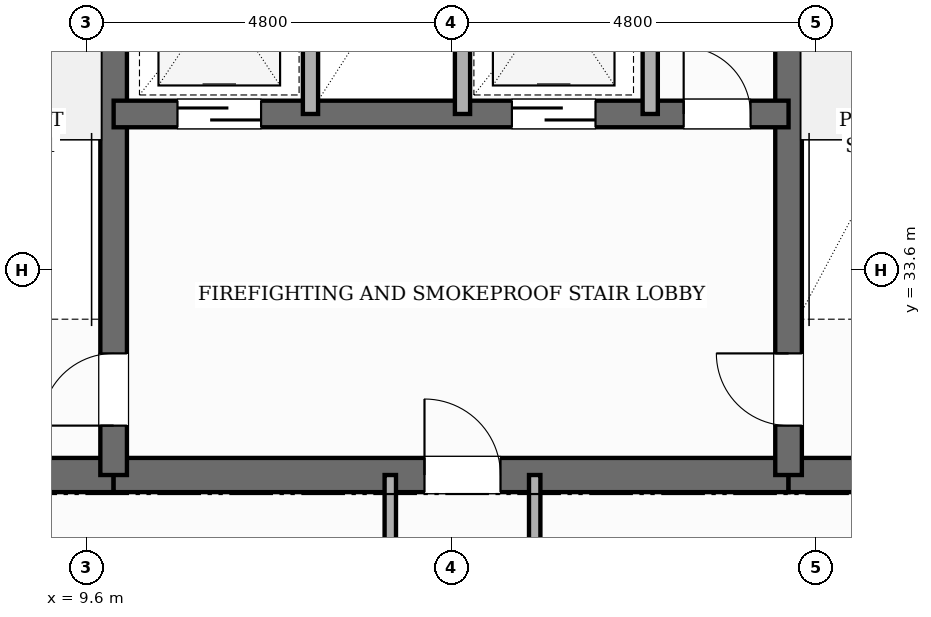
"""IFC4 building model, lengths in metres.
Left out: names, types, materials, properties, quantities, classifications, styles, units other than length and angle.
Written with IfcOpenShell. Run it as: python <this file> out.ifc"""

import sys

from ifc_helpers import new_model, si_unit, direction, frame, frame_2d, origin, place, context, subcontext, project, spatial, rectangle, extrude, element, fill, save


model = new_model("IFC4")
c1 = context("Model", 3, precision=1e-05, world=origin(), true_north=direction((0.0, 1.0)))
c2 = subcontext(c1, "Body", "Model", "MODEL_VIEW")
j1 = project(units=[si_unit("LENGTHUNIT", "METRE"), si_unit("PLANEANGLEUNIT", "RADIAN")], contexts=[c1])
p1 = place(None, origin())
s1 = spatial("IfcSite", under=j1, at=p1, CompositionType="ELEMENT")
p2 = place(p1, origin())
s2 = spatial("IfcBuilding", under=s1, at=p2, CompositionType="ELEMENT")
p3 = place(p2, frame((0.0, 0.0, 236.2)))
s3 = spatial("IfcBuildingStorey", under=s2, at=p3, CompositionType="ELEMENT", Elevation=236.2)
p4 = place(p3, frame((6.05, 30.9, 0.0), z_axis=(0.0, 0.0, 1.0), x_axis=(1.0, 0.0, 0.0)))
e1 = element("IfcWall", 1, at=p4, inside=s3, PredefinedType="SHEAR", context=c2, shape_type="SweptSolid", body=[
    extrude(rectangle(XDim=3.91, YDim=0.45, at=frame_2d((1.955, 0.0))), origin(), (0.0, 0.0, 1.0), 3.6),
])
p5 = place(p3, frame((9.96, 30.9, 0.0), z_axis=(0.0, 0.0, 1.0), x_axis=(1.0, 0.0, 0.0)))
e2 = element("IfcWall", 2, at=p5, inside=s3, PredefinedType="SHEAR", context=c2, shape_type="SweptSolid", body=[
    extrude(rectangle(XDim=8.88, YDim=0.45, at=frame_2d((4.44, 0.0))), origin(), (0.0, 0.0, 1.0), 3.6),
])
p6 = place(p5, frame((4.09, 0.0, 0.0)))
e3 = element("IfcOpeningElement", 3, at=p6, cuts=e2, PredefinedType="OPENING", context=c2, shape_type="SweptSolid", body=[
    extrude(rectangle(XDim=1.0, YDim=2.15, at=frame_2d((0.5, 1.075))), frame((0.0, 0.235, 0.0), z_axis=(0.0, -1.0, 0.0), x_axis=(1.0, 0.0, 0.0)), (0.0, 0.0, 1.0), 0.47),
])
p7 = place(p3, frame((18.84, 30.9, 0.0), z_axis=(0.0, 0.0, 1.0), x_axis=(1.0, 0.0, 0.0)))
e4 = element("IfcWall", 4, at=p7, inside=s3, PredefinedType="SHEAR", context=c2, shape_type="SweptSolid", body=[
    extrude(rectangle(XDim=3.91, YDim=0.45, at=frame_2d((1.955, 0.0))), origin(), (0.0, 0.0, 1.0), 3.6),
])
p8 = place(p3, frame((9.96, 30.9, 0.0), z_axis=(0.0, 0.0, 1.0), x_axis=(0.0, 1.0, 0.0)))
e5 = element("IfcWall", 5, at=p8, inside=s3, PredefinedType="SHEAR", context=c2, shape_type="SweptSolid", body=[
    extrude(rectangle(XDim=14.9, YDim=0.35, at=frame_2d((7.45, 0.0))), origin(), (0.0, 0.0, 1.0), 3.6),
])
p9 = place(p8, frame((0.65, 0.0, 0.0)))
e6 = element("IfcOpeningElement", 6, at=p9, cuts=e5, PredefinedType="OPENING", context=c2, shape_type="SweptSolid", body=[
    extrude(rectangle(XDim=0.95, YDim=2.1, at=frame_2d((0.475, 1.05))), frame((0.0, 0.185, 0.0), z_axis=(0.0, -1.0, 0.0), x_axis=(1.0, 0.0, 0.0)), (0.0, 0.0, 1.0), 0.37),
])
p10 = place(p8, frame((10.45, 0.0, 0.0)))
e7 = element("IfcOpeningElement", 7, at=p10, cuts=e5, PredefinedType="OPENING", context=c2, shape_type="SweptSolid", body=[
    extrude(rectangle(XDim=1.0, YDim=2.15, at=frame_2d((0.5, 1.075))), frame((0.0, 0.185, 0.0), z_axis=(0.0, -1.0, 0.0), x_axis=(1.0, 0.0, 0.0)), (0.0, 0.0, 1.0), 0.37),
])
p11 = place(p3, frame((18.84, 30.9, 0.0), z_axis=(0.0, 0.0, 1.0), x_axis=(0.0, 1.0, 0.0)))
e8 = element("IfcWall", 8, at=p11, inside=s3, PredefinedType="SHEAR", context=c2, shape_type="SweptSolid", body=[
    extrude(rectangle(XDim=14.9, YDim=0.35, at=frame_2d((7.45, 0.0))), origin(), (0.0, 0.0, 1.0), 3.6),
])
p12 = place(p11, frame((0.65, 0.0, 0.0)))
e9 = element("IfcOpeningElement", 9, at=p12, cuts=e8, PredefinedType="OPENING", context=c2, shape_type="SweptSolid", body=[
    extrude(rectangle(XDim=0.95, YDim=2.1, at=frame_2d((0.475, 1.05))), frame((0.0, 0.185, 0.0), z_axis=(0.0, -1.0, 0.0), x_axis=(1.0, 0.0, 0.0)), (0.0, 0.0, 1.0), 0.37),
])
p13 = place(p11, frame((10.45, 0.0, 0.0)))
e10 = element("IfcOpeningElement", 10, at=p13, cuts=e8, PredefinedType="OPENING", context=c2, shape_type="SweptSolid", body=[
    extrude(rectangle(XDim=1.0, YDim=2.15, at=frame_2d((0.5, 1.075))), frame((0.0, 0.185, 0.0), z_axis=(0.0, -1.0, 0.0), x_axis=(1.0, 0.0, 0.0)), (0.0, 0.0, 1.0), 0.37),
])
p14 = place(p3, frame((9.96, 35.65, 0.0), z_axis=(0.0, 0.0, 1.0), x_axis=(1.0, 0.0, 0.0)))
e11 = element("IfcWall", 11, at=p14, inside=s3, PredefinedType="SHEAR", context=c2, shape_type="SweptSolid", body=[
    extrude(rectangle(XDim=8.88, YDim=0.35, at=frame_2d((4.44, 0.0))), origin(), (0.0, 0.0, 1.0), 3.6),
])
p15 = place(p14, frame((0.84, 0.0, 0.0)))
e12 = element("IfcOpeningElement", 12, at=p15, cuts=e11, PredefinedType="OPENING", context=c2, shape_type="SweptSolid", body=[
    extrude(rectangle(XDim=1.1, YDim=2.15, at=frame_2d((0.55, 1.075))), frame((0.0, 0.185, 0.0), z_axis=(0.0, -1.0, 0.0), x_axis=(1.0, 0.0, 0.0)), (0.0, 0.0, 1.0), 0.37),
])
p16 = place(p14, frame((5.24, 0.0, 0.0)))
e13 = element("IfcOpeningElement", 13, at=p16, cuts=e11, PredefinedType="OPENING", context=c2, shape_type="SweptSolid", body=[
    extrude(rectangle(XDim=1.1, YDim=2.15, at=frame_2d((0.55, 1.075))), frame((0.0, 0.185, 0.0), z_axis=(0.0, -1.0, 0.0), x_axis=(1.0, 0.0, 0.0)), (0.0, 0.0, 1.0), 0.37),
])
p17 = place(p14, frame((7.5, 0.0, 0.0)))
e14 = element("IfcOpeningElement", 14, at=p17, cuts=e11, PredefinedType="OPENING", context=c2, shape_type="SweptSolid", body=[
    extrude(rectangle(XDim=0.88, YDim=2.1, at=frame_2d((0.44, 1.05))), frame((0.0, 0.185, 0.0), z_axis=(0.0, -1.0, 0.0), x_axis=(1.0, 0.0, 0.0)), (0.0, 0.0, 1.0), 0.37),
])
for number, where, z_axis, x_axis in (
    (15, (12.55, 35.65, 0.0), (0.0, 0.0, 1.0), (0.0, 1.0, 0.0)),
    (16, (14.55, 35.65, 0.0), (0.0, 0.0, 1.0), (0.0, 1.0, 0.0)),
):
    element("IfcWall", number, at=place(p3, frame(where, z_axis=z_axis, x_axis=x_axis)), inside=s3, PredefinedType="POLYGONAL", context=c2, shape_type="SweptSolid", body=[
        extrude(rectangle(XDim=3.07, YDim=0.2, at=frame_2d((1.535, 0.0))), origin(), (0.0, 0.0, 1.0), 3.32),
    ])
p18 = place(p3, frame((17.02, 35.65, 0.0), z_axis=(0.0, 0.0, 1.0), x_axis=(0.0, 1.0, 0.0)))
e17 = element("IfcWall", 17, at=p18, inside=s3, PredefinedType="POLYGONAL", context=c2, shape_type="SweptSolid", body=[
    extrude(rectangle(XDim=5.15, YDim=0.2, at=frame_2d((2.575, 0.0))), origin(), (0.0, 0.0, 1.0), 3.32),
])
p19 = place(p3, frame((13.6, 25.75, 0.0), z_axis=(0.0, 0.0, 1.0), x_axis=(0.0, 1.0, 0.0)))
e18 = element("IfcWall", 18, at=p19, inside=s3, PredefinedType="PARTITIONING", context=c2, shape_type="SweptSolid", body=[
    extrude(rectangle(XDim=5.15, YDim=0.15, at=frame_2d((2.575, 0.0))), origin(), (0.0, 0.0, 1.0), 3.32),
])
p20 = place(p19, frame((0.65, 0.0, 0.0)))
e19 = element("IfcOpeningElement", 19, at=p20, cuts=e18, PredefinedType="OPENING", context=c2, shape_type="SweptSolid", body=[
    extrude(rectangle(XDim=0.95, YDim=2.15, at=frame_2d((0.475, 1.075))), frame((0.0, 0.085, 0.0), z_axis=(0.0, -1.0, 0.0), x_axis=(1.0, 0.0, 0.0)), (0.0, 0.0, 1.0), 0.17),
])
p21 = place(p19, frame((3.1, 0.0, 0.0)))
e20 = element("IfcOpeningElement", 20, at=p21, cuts=e18, PredefinedType="OPENING", context=c2, shape_type="SweptSolid", body=[
    extrude(rectangle(XDim=0.95, YDim=2.15, at=frame_2d((0.475, 1.075))), frame((0.0, 0.085, 0.0), z_axis=(0.0, -1.0, 0.0), x_axis=(1.0, 0.0, 0.0)), (0.0, 0.0, 1.0), 0.17),
])
p22 = place(p3, frame((15.5, 25.75, 0.0), z_axis=(0.0, 0.0, 1.0), x_axis=(0.0, 1.0, 0.0)))
e21 = element("IfcWall", 21, at=p22, inside=s3, PredefinedType="PARTITIONING", context=c2, shape_type="SweptSolid", body=[
    extrude(rectangle(XDim=5.15, YDim=0.15, at=frame_2d((2.575, 0.0))), origin(), (0.0, 0.0, 1.0), 3.32),
])
p23 = place(p22, frame((1.1, 0.0, 0.0)))
e22 = element("IfcOpeningElement", 22, at=p23, cuts=e21, PredefinedType="OPENING", context=c2, shape_type="SweptSolid", body=[
    extrude(rectangle(XDim=0.95, YDim=2.15, at=frame_2d((0.475, 1.075))), frame((0.0, 0.085, 0.0), z_axis=(0.0, -1.0, 0.0), x_axis=(1.0, 0.0, 0.0)), (0.0, 0.0, 1.0), 0.17),
])
p24 = place(p9, origin())
e23 = element("IfcDoor", 23, at=p24, inside=s3, OperationType="SINGLE_SWING_LEFT", PredefinedType="DOOR", context=c2, shape_type="SweptSolid", body=[
    extrude(rectangle(XDim=0.95, YDim=2.1, at=frame_2d((0.475, 1.05))), frame((0.0, 0.025, 0.0), z_axis=(0.0, -1.0, 0.0), x_axis=(1.0, 0.0, 0.0)), (0.0, 0.0, 1.0), 0.05),
])
fill(e6, e23)
p25 = place(p12, origin())
e24 = element("IfcDoor", 24, at=p25, inside=s3, OperationType="SINGLE_SWING_RIGHT", PredefinedType="DOOR", context=c2, shape_type="SweptSolid", body=[
    extrude(rectangle(XDim=0.95, YDim=2.1, at=frame_2d((0.475, 1.05))), frame((0.0, 0.025, 0.0), z_axis=(0.0, -1.0, 0.0), x_axis=(1.0, 0.0, 0.0)), (0.0, 0.0, 1.0), 0.05),
])
fill(e9, e24)
p26 = place(p6, origin())
e25 = element("IfcDoor", 25, at=p26, inside=s3, OperationType="SINGLE_SWING_LEFT", PredefinedType="DOOR", context=c2, shape_type="SweptSolid", body=[
    extrude(rectangle(XDim=1.0, YDim=2.15, at=frame_2d((0.5, 1.075))), frame((0.0, 0.025, 0.0), z_axis=(0.0, -1.0, 0.0), x_axis=(1.0, 0.0, 0.0)), (0.0, 0.0, 1.0), 0.05),
])
fill(e3, e25)
p27 = place(p15, origin())
e26 = element("IfcDoor", 26, at=p27, inside=s3, OperationType="SLIDING_TO_LEFT", PredefinedType="DOOR", context=c2, shape_type="SweptSolid", body=[
    extrude(rectangle(XDim=1.1, YDim=2.15, at=frame_2d((0.55, 1.075))), frame((0.0, 0.025, 0.0), z_axis=(0.0, -1.0, 0.0), x_axis=(1.0, 0.0, 0.0)), (0.0, 0.0, 1.0), 0.05),
])
fill(e12, e26)
p28 = place(p16, origin())
e27 = element("IfcDoor", 27, at=p28, inside=s3, OperationType="SLIDING_TO_RIGHT", PredefinedType="DOOR", context=c2, shape_type="SweptSolid", body=[
    extrude(rectangle(XDim=1.1, YDim=2.15, at=frame_2d((0.55, 1.075))), frame((0.0, 0.025, 0.0), z_axis=(0.0, -1.0, 0.0), x_axis=(1.0, 0.0, 0.0)), (0.0, 0.0, 1.0), 0.05),
])
fill(e13, e27)
p29 = place(p17, origin())
e28 = element("IfcDoor", 28, at=p29, inside=s3, OperationType="SINGLE_SWING_LEFT", PredefinedType="DOOR", context=c2, shape_type="SweptSolid", body=[
    extrude(rectangle(XDim=0.88, YDim=2.1, at=frame_2d((0.44, 1.05))), frame((0.0, 0.025, 0.0), z_axis=(0.0, -1.0, 0.0), x_axis=(1.0, 0.0, 0.0)), (0.0, 0.0, 1.0), 0.05),
])
fill(e14, e28)
save(model, sys.argv[1])
